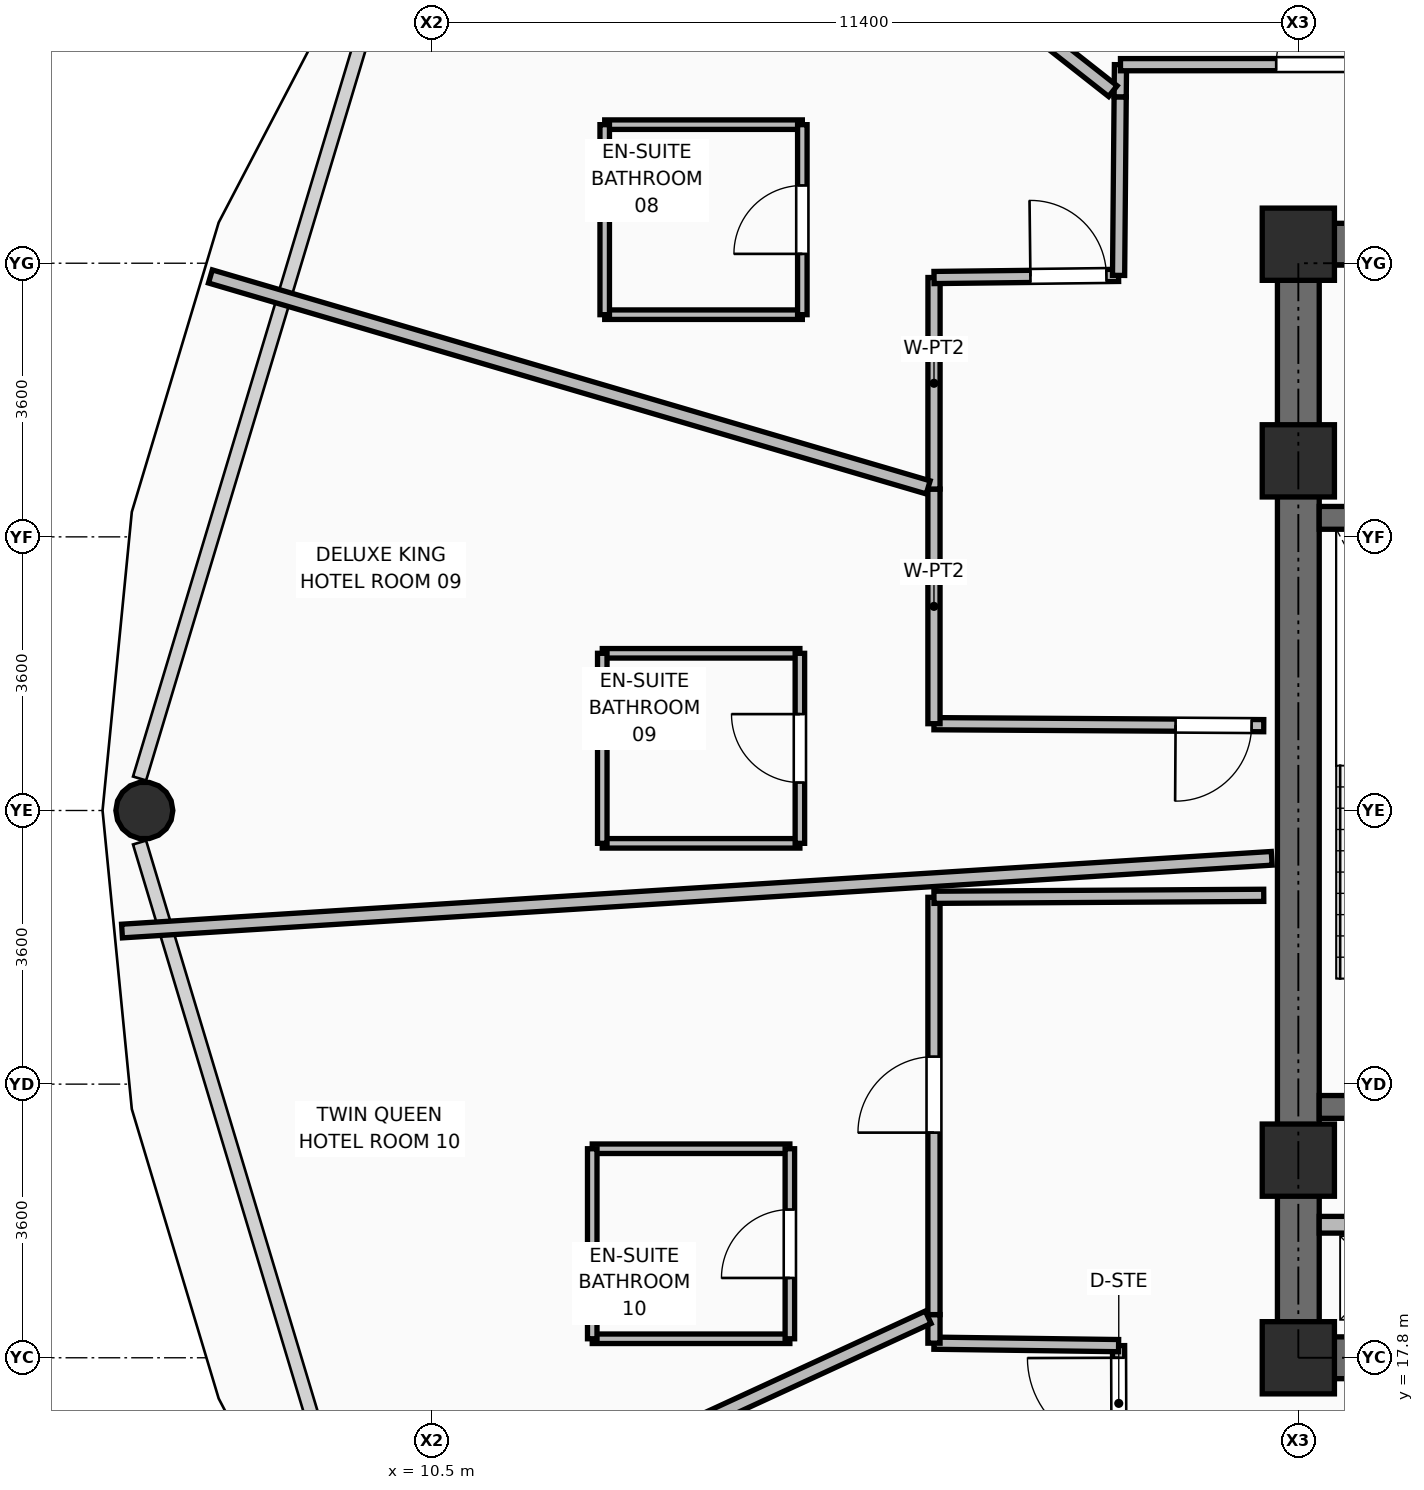
"""IFC4 building model, lengths in metres.
Left out: names, types, materials, properties, quantities, classifications, styles, units other than length and angle.
Written with IfcOpenShell. Run it as: python <this file> out.ifc"""

import sys

from ifc_helpers import new_model, si_unit, direction, frame, frame_2d, origin, origin_2d, place, context, subcontext, project, spatial, rectangle, hollow_circle, extrude, element, fill, save


model = new_model("IFC4")
c1 = context("Model", 3, precision=1e-05, world=origin(), true_north=direction((0.0, 1.0)))
c2 = subcontext(c1, "Body", "Model", "MODEL_VIEW")
j1 = project(units=[si_unit("LENGTHUNIT", "METRE"), si_unit("PLANEANGLEUNIT", "RADIAN")], contexts=[c1])
p1 = place(None, origin())
s1 = spatial("IfcSite", under=j1, at=p1, CompositionType="ELEMENT")
p2 = place(p1, origin())
s2 = spatial("IfcBuilding", under=s1, at=p2, CompositionType="ELEMENT")
p3 = place(p2, frame((0.0, 0.0, 153.45)))
s3 = spatial("IfcBuildingStorey", under=s2, at=p3, CompositionType="ELEMENT", Elevation=153.45)
for number, where, z_axis, x_axis in (
    (1, (21.9, 17.8, 0.0), (0.0, 0.0, 1.0), (1.0, 0.0, 0.0)),
    (2, (21.9, 20.4, 0.0), (0.0, 0.0, 1.0), (1.0, 0.0, 0.0)),
    (3, (21.9, 29.6, 0.0), (0.0, 0.0, 1.0), (1.0, 0.0, 0.0)),
    (4, (21.9, 32.45, 0.0), (0.0, 0.0, 1.0), (1.0, 0.0, 0.0)),
):
    element("IfcColumn", number, at=place(p3, frame(where, z_axis=z_axis, x_axis=x_axis)), inside=s3, PredefinedType="COLUMN", context=c2, shape_type="SweptSolid", body=[
        extrude(rectangle(XDim=0.95, YDim=0.95, at=origin_2d()), origin(), (0.0, 0.0, 1.0), 3.75),
    ])
p4 = place(p3, frame((6.717, 25.0, 0.0), z_axis=(0.0, 0.0, 1.0), x_axis=(1.0, 0.0, 0.0)))
e5 = element("IfcColumn", 5, at=p4, inside=s3, PredefinedType="COLUMN", context=c2, shape_type="SweptSolid", body=[
    extrude(hollow_circle(Radius=0.375, WallThickness=0.035, at=origin_2d()), origin(), (0.0, 0.0, 1.0), 3.57),
])
p5 = place(p3, frame((21.625, 17.8, 0.0), z_axis=(0.0, 0.0, 1.0), x_axis=(1.0, 0.0, 0.0)))
e6 = element("IfcWall", 6, at=p5, inside=s3, PredefinedType="SHEAR", context=c2, shape_type="SweptSolid", body=[
    extrude(rectangle(XDim=2.125, YDim=0.55, at=frame_2d((1.062, 0.0))), origin(), (0.0, 0.0, 1.0), 3.57),
])
p6 = place(p3, frame((21.625, 32.45, 0.0), z_axis=(0.0, 0.0, 1.0), x_axis=(1.0, 0.0, 0.0)))
e7 = element("IfcWall", 7, at=p6, inside=s3, PredefinedType="SHEAR", context=c2, shape_type="SweptSolid", body=[
    extrude(rectangle(XDim=19.75, YDim=0.55, at=frame_2d((9.875, 0.0))), origin(), (0.0, 0.0, 1.0), 3.57),
])
p7 = place(p6, frame((2.125, 0.0, 0.0)))
e8 = element("IfcOpeningElement", 8, at=p7, cuts=e7, PredefinedType="OPENING", context=c2, shape_type="SweptSolid", body=[
    extrude(rectangle(XDim=1.1, YDim=2.1, at=frame_2d((0.55, 1.05))), frame((0.0, 0.285, 0.0), z_axis=(0.0, -1.0, 0.0), x_axis=(1.0, 0.0, 0.0)), (0.0, 0.0, 1.0), 0.57),
])
p8 = place(p6, frame((15.515, 0.0, 0.0)))
e9 = element("IfcOpeningElement", 9, at=p8, cuts=e7, PredefinedType="OPENING", context=c2, shape_type="SweptSolid", body=[
    extrude(rectangle(XDim=1.0, YDim=2.1, at=frame_2d((0.5, 1.05))), frame((0.0, 0.285, 0.0), z_axis=(0.0, -1.0, 0.0), x_axis=(1.0, 0.0, 0.0)), (0.0, 0.0, 1.0), 0.57),
])
p9 = place(p6, frame((17.525, 0.0, 0.0)))
e10 = element("IfcOpeningElement", 10, at=p9, cuts=e7, PredefinedType="OPENING", context=c2, shape_type="SweptSolid", body=[
    extrude(rectangle(XDim=0.9, YDim=2.1, at=frame_2d((0.45, 1.05))), frame((0.0, 0.285, 0.0), z_axis=(0.0, -1.0, 0.0), x_axis=(1.0, 0.0, 0.0)), (0.0, 0.0, 1.0), 0.57),
])
p10 = place(p3, frame((21.9, 18.075, 0.0), z_axis=(0.0, 0.0, 1.0), x_axis=(0.0, 1.0, 0.0)))
e11 = element("IfcWall", 11, at=p10, inside=s3, PredefinedType="SHEAR", context=c2, shape_type="SweptSolid", body=[
    extrude(rectangle(XDim=14.1, YDim=0.55, at=frame_2d((7.05, 0.0))), origin(), (0.0, 0.0, 1.0), 3.57),
])
p11 = place(p3, frame((22.175, 21.1, 0.0), z_axis=(0.0, 0.0, 1.0), x_axis=(1.0, 0.0, 0.0)))
e12 = element("IfcWall", 12, at=p11, inside=s3, PredefinedType="SHEAR", context=c2, shape_type="SweptSolid", body=[
    extrude(rectangle(XDim=3.565, YDim=0.3, at=frame_2d((1.782, 0.0))), origin(), (0.0, 0.0, 1.0), 3.57),
])
p12 = place(p11, frame((2.045, 0.0, 0.0)))
e13 = element("IfcOpeningElement", 13, at=p12, cuts=e12, PredefinedType="OPENING", context=c2, shape_type="SweptSolid", body=[
    extrude(rectangle(XDim=1.05, YDim=2.1, at=frame_2d((0.525, 1.05))), frame((0.0, 0.16, 0.0), z_axis=(0.0, -1.0, 0.0), x_axis=(1.0, 0.0, 0.0)), (0.0, 0.0, 1.0), 0.32),
])
p13 = place(p3, frame((22.175, 28.85, 0.0), z_axis=(0.0, 0.0, 1.0), x_axis=(1.0, 0.0, 0.0)))
e14 = element("IfcWall", 14, at=p13, inside=s3, PredefinedType="SHEAR", context=c2, shape_type="SweptSolid", body=[
    extrude(rectangle(XDim=3.565, YDim=0.3, at=frame_2d((1.782, 0.0))), origin(), (0.0, 0.0, 1.0), 3.57),
])
p14 = place(p3, frame((22.175, 19.55, 0.0), z_axis=(0.0, 0.0, 1.0), x_axis=(1.0, 0.0, 0.0)))
e15 = element("IfcWall", 15, at=p14, inside=s3, PredefinedType="PARTITIONING", context=c2, shape_type="SweptSolid", body=[
    extrude(rectangle(XDim=1.615, YDim=0.22, at=frame_2d((0.808, 0.0))), origin(), (0.0, 0.0, 1.0), 2.595),
])
p15 = place(p3, frame((21.445, 26.116, 0.0), z_axis=(0.0, 0.0, 1.0), x_axis=(-0.999981878077, 0.006020258873, 0.0)))
e16 = element("IfcWall", 16, at=p15, inside=s3, PredefinedType="PARTITIONING", context=c2, shape_type="SweptSolid", body=[
    extrude(rectangle(XDim=4.339, YDim=0.16, at=frame_2d((2.169, 0.0))), origin(), (0.0, 0.0, 1.0), 2.595),
])
p16 = place(p15, frame((0.16, 0.0, 0.0)))
e17 = element("IfcOpeningElement", 17, at=p16, cuts=e16, PredefinedType="OPENING", context=c2, shape_type="SweptSolid", body=[
    extrude(rectangle(XDim=1.0, YDim=2.1, at=frame_2d((0.5, 1.05))), frame((0.0, 0.09, 0.0), z_axis=(0.0, -1.0, 0.0), x_axis=(1.0, 0.0, 0.0)), (0.0, 0.0, 1.0), 0.18),
])
p17 = place(p3, frame((17.106, 26.142, 0.0), z_axis=(0.0, 0.0, 1.0), x_axis=(0.0, 1.0, 0.0)))
e18 = element("IfcWall", 18, at=p17, inside=s3, PredefinedType="PARTITIONING", context=c2, shape_type="SweptSolid", body=[
    extrude(rectangle(XDim=3.087, YDim=0.16, at=frame_2d((1.543, 0.0))), origin(), (0.0, 0.0, 1.0), 3.55),
])
p18 = place(p3, frame((17.106, 29.229, 0.0), z_axis=(0.0, 0.0, 1.0), x_axis=(0.000350907953, 0.999999938432, 0.0)))
e19 = element("IfcWall", 19, at=p18, inside=s3, PredefinedType="PARTITIONING", context=c2, shape_type="SweptSolid", body=[
    extrude(rectangle(XDim=2.783, YDim=0.16, at=frame_2d((1.392, 0.0))), origin(), (0.0, 0.0, 1.0), 3.55),
])
p19 = place(p3, frame((17.107, 32.012, 0.0), z_axis=(0.0, 0.0, 1.0), x_axis=(0.999933148284, 0.011562826752, 0.0)))
e20 = element("IfcWall", 20, at=p19, inside=s3, PredefinedType="PARTITIONING", context=c2, shape_type="SweptSolid", body=[
    extrude(rectangle(XDim=2.428, YDim=0.16, at=frame_2d((1.214, 0.0))), origin(), (0.0, 0.0, 1.0), 3.55),
])
p20 = place(p19, frame((1.268, 0.0, 0.0)))
e21 = element("IfcOpeningElement", 21, at=p20, cuts=e20, PredefinedType="OPENING", context=c2, shape_type="SweptSolid", body=[
    extrude(rectangle(XDim=1.0, YDim=2.1, at=frame_2d((0.5, 1.05))), frame((0.0, 0.09, 0.0), z_axis=(0.0, -1.0, 0.0), x_axis=(1.0, 0.0, 0.0)), (0.0, 0.0, 1.0), 0.18),
])
p21 = place(p3, frame((19.535, 32.04, 0.0), z_axis=(0.0, 0.0, 1.0), x_axis=(0.008938422662, 0.999960051502, 0.0)))
e22 = element("IfcWall", 22, at=p21, inside=s3, PredefinedType="PARTITIONING", context=c2, shape_type="SweptSolid", body=[
    extrude(rectangle(XDim=2.349, YDim=0.16, at=frame_2d((1.174, 0.0))), origin(), (0.0, 0.0, 1.0), 3.006),
])
p22 = place(p3, frame((19.556, 34.389, 0.0), z_axis=(0.0, 0.0, 1.0), x_axis=(0.009809106822, 0.999951889554, 0.0)))
e23 = element("IfcWall", 23, at=p22, inside=s3, PredefinedType="PARTITIONING", context=c2, shape_type="SweptSolid", body=[
    extrude(rectangle(XDim=0.423, YDim=0.16, at=frame_2d((0.211, 0.0))), origin(), (0.0, 0.0, 1.0), 3.55),
])
p23 = place(p3, frame((19.56, 34.812, 0.0), z_axis=(0.0, 0.0, 1.0), x_axis=(0.999999867217, 0.000515331032, 0.0)))
e24 = element("IfcWall", 24, at=p23, inside=s3, PredefinedType="PARTITIONING", context=c2, shape_type="SweptSolid", body=[
    extrude(rectangle(XDim=3.79, YDim=0.16, at=frame_2d((1.895, 0.0))), origin(), (0.0, 0.0, 1.0), 3.006),
])
p24 = place(p23, frame((2.049, 0.0, 0.0)))
e25 = element("IfcOpeningElement", 25, at=p24, cuts=e24, PredefinedType="OPENING", context=c2, shape_type="SweptSolid", body=[
    extrude(rectangle(XDim=1.0, YDim=2.1, at=frame_2d((0.5, 1.05))), frame((0.0, 0.09, 0.0), z_axis=(0.0, -1.0, 0.0), x_axis=(1.0, 0.0, 0.0)), (0.0, 0.0, 1.0), 0.18),
])
p25 = place(p3, frame((19.552, 12.571, 0.0), z_axis=(0.0, 0.0, 1.0), x_axis=(-0.003171279301, 0.999994971481, 0.0)))
e26 = element("IfcWall", 26, at=p25, inside=s3, PredefinedType="PARTITIONING", context=c2, shape_type="SweptSolid", body=[
    extrude(rectangle(XDim=5.389, YDim=0.16, at=frame_2d((2.694, 0.0))), origin(), (0.0, 0.0, 1.0), 3.006),
])
p26 = place(p25, frame((4.029, 0.0, 0.0)))
e27 = element("IfcOpeningElement", 27, at=p26, cuts=e26, PredefinedType="OPENING", context=c2, shape_type="SweptSolid", body=[
    extrude(rectangle(XDim=1.2, YDim=2.1, at=frame_2d((0.6, 1.05))), frame((0.0, 0.09, 0.0), z_axis=(0.0, -1.0, 0.0), x_axis=(1.0, 0.0, 0.0)), (0.0, 0.0, 1.0), 0.18),
])
p27 = place(p3, frame((19.535, 17.96, 0.0), z_axis=(0.0, 0.0, 1.0), x_axis=(-0.999913324318, 0.013166011206, 0.0)))
e28 = element("IfcWall", 28, at=p27, inside=s3, PredefinedType="PARTITIONING", context=c2, shape_type="SweptSolid", body=[
    extrude(rectangle(XDim=2.429, YDim=0.16, at=frame_2d((1.215, 0.0))), origin(), (0.0, 0.0, 1.0), 3.55),
])
p28 = place(p3, frame((17.106, 17.992, 0.0), z_axis=(0.0, 0.0, 1.0), x_axis=(0.0, 1.0, 0.0)))
e29 = element("IfcWall", 29, at=p28, inside=s3, PredefinedType="PARTITIONING", context=c2, shape_type="SweptSolid", body=[
    extrude(rectangle(XDim=0.376, YDim=0.16, at=frame_2d((0.188, 0.0))), origin(), (0.0, 0.0, 1.0), 3.55),
])
p29 = place(p3, frame((17.106, 18.368, 0.0), z_axis=(0.0, 0.0, 1.0), x_axis=(0.0, 1.0, 0.0)))
e30 = element("IfcWall", 30, at=p29, inside=s3, PredefinedType="PARTITIONING", context=c2, shape_type="SweptSolid", body=[
    extrude(rectangle(XDim=5.49, YDim=0.16, at=frame_2d((2.745, 0.0))), origin(), (0.0, 0.0, 1.0), 3.006),
])
p30 = place(p29, frame((2.394, 0.0, 0.0)))
e31 = element("IfcOpeningElement", 31, at=p30, cuts=e30, PredefinedType="OPENING", context=c2, shape_type="SweptSolid", body=[
    extrude(rectangle(XDim=1.0, YDim=2.1, at=frame_2d((0.5, 1.05))), frame((0.0, 0.09, 0.0), z_axis=(0.0, -1.0, 0.0), x_axis=(1.0, 0.0, 0.0)), (0.0, 0.0, 1.0), 0.18),
])
p31 = place(p3, frame((17.106, 23.858, 0.0), z_axis=(0.0, 0.0, 1.0), x_axis=(0.999981878077, 0.006020258873, 0.0)))
e32 = element("IfcWall", 32, at=p31, inside=s3, PredefinedType="PARTITIONING", context=c2, shape_type="SweptSolid", body=[
    extrude(rectangle(XDim=4.339, YDim=0.16, at=frame_2d((2.169, 0.0))), origin(), (0.0, 0.0, 1.0), 2.595),
])
p32 = place(p3, frame((23.288, 34.89, 0.0), z_axis=(0.0, 0.0, 1.0), x_axis=(-0.638821611384, 0.76935489134, 0.0)))
e33 = element("IfcWall", 33, at=p32, inside=s3, PredefinedType="PARTITIONING", context=c2, shape_type="SweptSolid", body=[
    extrude(rectangle(XDim=10.581, YDim=0.18, at=frame_2d((5.29, 0.0))), origin(), (0.0, 0.0, 1.0), 2.852),
])
p33 = place(p3, frame((19.46, 34.464, 0.0), z_axis=(0.0, 0.0, 1.0), x_axis=(-0.786155203297, 0.618029122558, 0.0)))
e34 = element("IfcWall", 34, at=p33, inside=s3, PredefinedType="PARTITIONING", context=c2, shape_type="SweptSolid", body=[
    extrude(rectangle(XDim=8.726, YDim=0.18, at=frame_2d((4.363, 0.0))), origin(), (0.0, 0.0, 1.0), 2.852),
])
p34 = place(p3, frame((17.03, 29.251, 0.0), z_axis=(0.0, 0.0, 1.0), x_axis=(-0.959441691332, 0.281907149489, 0.0)))
e35 = element("IfcWall", 35, at=p34, inside=s3, PredefinedType="PARTITIONING", context=c2, shape_type="SweptSolid", body=[
    extrude(rectangle(XDim=9.843, YDim=0.18, at=frame_2d((4.922, 0.0))), origin(), (0.0, 0.0, 1.0), 2.852),
])
p35 = place(p3, frame((21.55, 24.371, 0.0), z_axis=(0.0, 0.0, 1.0), x_axis=(-0.998004655197, -0.063140384899, 0.0)))
e36 = element("IfcWall", 36, at=p35, inside=s3, PredefinedType="PARTITIONING", context=c2, shape_type="SweptSolid", body=[
    extrude(rectangle(XDim=15.157, YDim=0.18, at=frame_2d((7.579, 0.0))), origin(), (0.0, 0.0, 1.0), 2.595),
])
p36 = place(p3, frame((17.03, 18.333, 0.0), z_axis=(0.0, 0.0, 1.0), x_axis=(-0.908253037205, -0.418421343155, 0.0)))
e37 = element("IfcWall", 37, at=p36, inside=s3, PredefinedType="PARTITIONING", context=c2, shape_type="SweptSolid", body=[
    extrude(rectangle(XDim=8.68, YDim=0.18, at=frame_2d((4.34, 0.0))), origin(), (0.0, 0.0, 1.0), 2.852),
])
for number, where, z_axis, x_axis in (
    (38, (12.774, 31.523, 0.0), (0.0, 0.0, 1.0), (1.0, 0.0, 0.0)),
    (39, (12.774, 34.023, 0.0), (0.0, 0.0, 1.0), (1.0, 0.0, 0.0)),
):
    element("IfcWall", number, at=place(p3, frame(where, z_axis=z_axis, x_axis=x_axis)), inside=s3, PredefinedType="PARTITIONING", context=c2, shape_type="SweptSolid", body=[
        extrude(rectangle(XDim=2.6, YDim=0.125, at=frame_2d((1.3, 0.0))), origin(), (0.0, 0.0, 1.0), 3.55),
    ])
p37 = place(p3, frame((12.774, 31.523, 0.0), z_axis=(0.0, 0.0, 1.0), x_axis=(0.0, 1.0, 0.0)))
e40 = element("IfcWall", 40, at=p37, inside=s3, PredefinedType="PARTITIONING", context=c2, shape_type="SweptSolid", body=[
    extrude(rectangle(XDim=2.5, YDim=0.125, at=frame_2d((1.25, 0.0))), origin(), (0.0, 0.0, 1.0), 3.55),
])
p38 = place(p3, frame((15.374, 31.523, 0.0), z_axis=(0.0, 0.0, 1.0), x_axis=(0.0, 1.0, 0.0)))
e41 = element("IfcWall", 41, at=p38, inside=s3, PredefinedType="PARTITIONING", context=c2, shape_type="SweptSolid", body=[
    extrude(rectangle(XDim=2.5, YDim=0.125, at=frame_2d((1.25, 0.0))), origin(), (0.0, 0.0, 1.0), 3.55),
])
p39 = place(p38, frame((0.8, 0.0, 0.0)))
e42 = element("IfcOpeningElement", 42, at=p39, cuts=e41, PredefinedType="OPENING", context=c2, shape_type="SweptSolid", body=[
    extrude(rectangle(XDim=0.9, YDim=2.1, at=frame_2d((0.45, 1.05))), frame((0.0, 0.073, 0.0), z_axis=(0.0, -1.0, 0.0), x_axis=(1.0, 0.0, 0.0)), (0.0, 0.0, 1.0), 0.145),
])
for number, where, z_axis, x_axis in (
    (43, (12.742, 24.568, 0.0), (0.0, 0.0, 1.0), (1.0, 0.0, 0.0)),
    (44, (12.742, 27.068, 0.0), (0.0, 0.0, 1.0), (1.0, 0.0, 0.0)),
):
    element("IfcWall", number, at=place(p3, frame(where, z_axis=z_axis, x_axis=x_axis)), inside=s3, PredefinedType="PARTITIONING", context=c2, shape_type="SweptSolid", body=[
        extrude(rectangle(XDim=2.6, YDim=0.125, at=frame_2d((1.3, 0.0))), origin(), (0.0, 0.0, 1.0), 3.55),
    ])
p40 = place(p3, frame((12.742, 24.568, 0.0), z_axis=(0.0, 0.0, 1.0), x_axis=(0.0, 1.0, 0.0)))
e45 = element("IfcWall", 45, at=p40, inside=s3, PredefinedType="PARTITIONING", context=c2, shape_type="SweptSolid", body=[
    extrude(rectangle(XDim=2.5, YDim=0.125, at=frame_2d((1.25, 0.0))), origin(), (0.0, 0.0, 1.0), 3.55),
])
p41 = place(p3, frame((15.342, 24.568, 0.0), z_axis=(0.0, 0.0, 1.0), x_axis=(0.0, 1.0, 0.0)))
e46 = element("IfcWall", 46, at=p41, inside=s3, PredefinedType="PARTITIONING", context=c2, shape_type="SweptSolid", body=[
    extrude(rectangle(XDim=2.5, YDim=0.125, at=frame_2d((1.25, 0.0))), origin(), (0.0, 0.0, 1.0), 3.55),
])
p42 = place(p41, frame((0.8, 0.0, 0.0)))
e47 = element("IfcOpeningElement", 47, at=p42, cuts=e46, PredefinedType="OPENING", context=c2, shape_type="SweptSolid", body=[
    extrude(rectangle(XDim=0.9, YDim=2.1, at=frame_2d((0.45, 1.05))), frame((0.0, 0.073, 0.0), z_axis=(0.0, -1.0, 0.0), x_axis=(1.0, 0.0, 0.0)), (0.0, 0.0, 1.0), 0.145),
])
for number, where, z_axis, x_axis in (
    (48, (12.61, 18.05, 0.0), (0.0, 0.0, 1.0), (1.0, 0.0, 0.0)),
    (49, (12.61, 20.55, 0.0), (0.0, 0.0, 1.0), (1.0, 0.0, 0.0)),
):
    element("IfcWall", number, at=place(p3, frame(where, z_axis=z_axis, x_axis=x_axis)), inside=s3, PredefinedType="PARTITIONING", context=c2, shape_type="SweptSolid", body=[
        extrude(rectangle(XDim=2.6, YDim=0.125, at=frame_2d((1.3, 0.0))), origin(), (0.0, 0.0, 1.0), 3.55),
    ])
p43 = place(p3, frame((12.61, 18.05, 0.0), z_axis=(0.0, 0.0, 1.0), x_axis=(0.0, 1.0, 0.0)))
e50 = element("IfcWall", 50, at=p43, inside=s3, PredefinedType="PARTITIONING", context=c2, shape_type="SweptSolid", body=[
    extrude(rectangle(XDim=2.5, YDim=0.125, at=frame_2d((1.25, 0.0))), origin(), (0.0, 0.0, 1.0), 3.55),
])
p44 = place(p3, frame((15.21, 18.05, 0.0), z_axis=(0.0, 0.0, 1.0), x_axis=(0.0, 1.0, 0.0)))
e51 = element("IfcWall", 51, at=p44, inside=s3, PredefinedType="PARTITIONING", context=c2, shape_type="SweptSolid", body=[
    extrude(rectangle(XDim=2.5, YDim=0.125, at=frame_2d((1.25, 0.0))), origin(), (0.0, 0.0, 1.0), 3.55),
])
p45 = place(p44, frame((0.8, 0.0, 0.0)))
e52 = element("IfcOpeningElement", 52, at=p45, cuts=e51, PredefinedType="OPENING", context=c2, shape_type="SweptSolid", body=[
    extrude(rectangle(XDim=0.9, YDim=2.1, at=frame_2d((0.45, 1.05))), frame((0.0, 0.073, 0.0), z_axis=(0.0, -1.0, 0.0), x_axis=(1.0, 0.0, 0.0)), (0.0, 0.0, 1.0), 0.145),
])
p46 = place(p24, origin())
e53 = element("IfcDoor", 53, at=p46, inside=s3, OperationType="SINGLE_SWING_RIGHT", PredefinedType="DOOR", context=c2, shape_type="SweptSolid", body=[
    extrude(rectangle(XDim=1.0, YDim=2.1, at=frame_2d((0.5, 1.05))), frame((0.0, 0.025, 0.0), z_axis=(0.0, -1.0, 0.0), x_axis=(1.0, 0.0, 0.0)), (0.0, 0.0, 1.0), 0.05),
])
fill(e25, e53)
p47 = place(p39, origin())
e54 = element("IfcDoor", 54, at=p47, inside=s3, OperationType="SINGLE_SWING_LEFT", PredefinedType="DOOR", context=c2, shape_type="SweptSolid", body=[
    extrude(rectangle(XDim=0.9, YDim=2.1, at=frame_2d((0.45, 1.05))), frame((0.0, 0.025, 0.0), z_axis=(0.0, -1.0, 0.0), x_axis=(1.0, 0.0, 0.0)), (0.0, 0.0, 1.0), 0.05),
])
fill(e42, e54)
p48 = place(p20, origin())
e55 = element("IfcDoor", 55, at=p48, inside=s3, OperationType="SINGLE_SWING_LEFT", PredefinedType="DOOR", context=c2, shape_type="SweptSolid", body=[
    extrude(rectangle(XDim=1.0, YDim=2.1, at=frame_2d((0.5, 1.05))), frame((0.0, 0.025, 0.0), z_axis=(0.0, -1.0, 0.0), x_axis=(1.0, 0.0, 0.0)), (0.0, 0.0, 1.0), 0.05),
])
fill(e21, e55)
p49 = place(p42, origin())
e56 = element("IfcDoor", 56, at=p49, inside=s3, OperationType="SINGLE_SWING_RIGHT", PredefinedType="DOOR", context=c2, shape_type="SweptSolid", body=[
    extrude(rectangle(XDim=0.9, YDim=2.1, at=frame_2d((0.45, 1.05))), frame((0.0, 0.025, 0.0), z_axis=(0.0, -1.0, 0.0), x_axis=(1.0, 0.0, 0.0)), (0.0, 0.0, 1.0), 0.05),
])
fill(e47, e56)
p50 = place(p16, origin())
e57 = element("IfcDoor", 57, at=p50, inside=s3, OperationType="SINGLE_SWING_RIGHT", PredefinedType="DOOR", context=c2, shape_type="SweptSolid", body=[
    extrude(rectangle(XDim=1.0, YDim=2.1, at=frame_2d((0.5, 1.05))), frame((0.0, 0.025, 0.0), z_axis=(0.0, -1.0, 0.0), x_axis=(1.0, 0.0, 0.0)), (0.0, 0.0, 1.0), 0.05),
])
fill(e17, e57)
p51 = place(p45, origin())
e58 = element("IfcDoor", 58, at=p51, inside=s3, OperationType="SINGLE_SWING_LEFT", PredefinedType="DOOR", context=c2, shape_type="SweptSolid", body=[
    extrude(rectangle(XDim=0.9, YDim=2.1, at=frame_2d((0.45, 1.05))), frame((0.0, 0.025, 0.0), z_axis=(0.0, -1.0, 0.0), x_axis=(1.0, 0.0, 0.0)), (0.0, 0.0, 1.0), 0.05),
])
fill(e52, e58)
p52 = place(p30, origin())
e59 = element("IfcDoor", 59, at=p52, inside=s3, OperationType="SINGLE_SWING_LEFT", PredefinedType="DOOR", context=c2, shape_type="SweptSolid", body=[
    extrude(rectangle(XDim=1.0, YDim=2.1, at=frame_2d((0.5, 1.05))), frame((0.0, 0.025, 0.0), z_axis=(0.0, -1.0, 0.0), x_axis=(1.0, 0.0, 0.0)), (0.0, 0.0, 1.0), 0.05),
])
fill(e31, e59)
p53 = place(p26, origin())
e60 = element("IfcDoor", 60, at=p53, inside=s3, OperationType="SINGLE_SWING_RIGHT", PredefinedType="DOOR", context=c2, shape_type="SweptSolid", body=[
    extrude(rectangle(XDim=1.2, YDim=2.1, at=frame_2d((0.6, 1.05))), frame((0.0, 0.025, 0.0), z_axis=(0.0, -1.0, 0.0), x_axis=(1.0, 0.0, 0.0)), (0.0, 0.0, 1.0), 0.05),
])
fill(e27, e60)
save(model, sys.argv[1])
